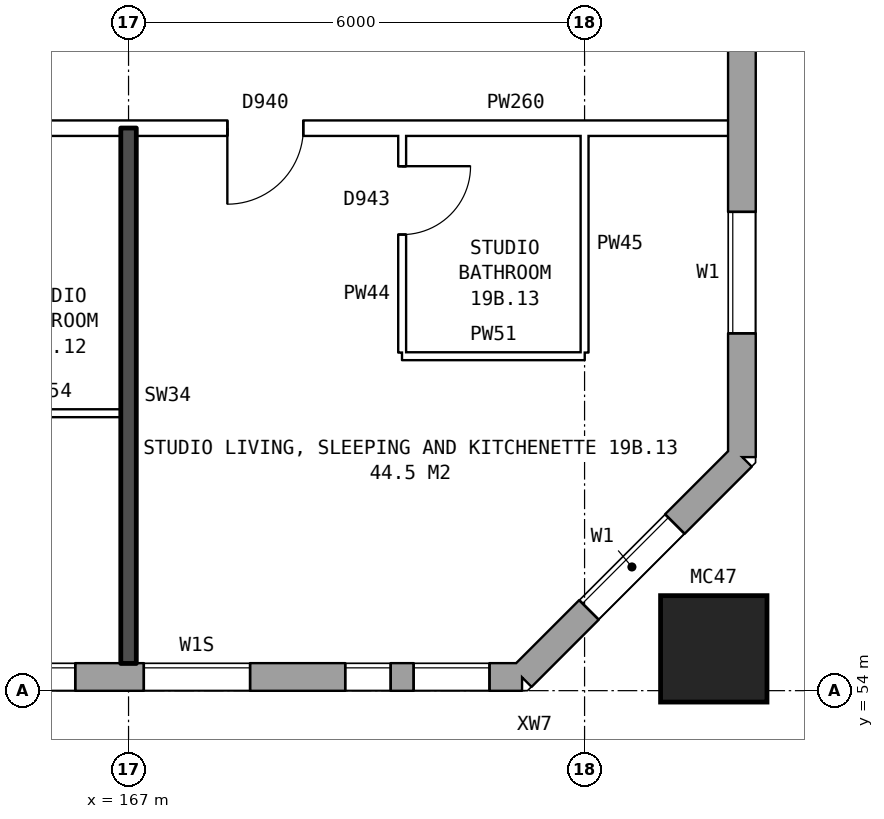
"""IFC4 building model, lengths in metres.
Left out: names, types, materials, properties, quantities, classifications, styles, units other than length and angle.
Written with IfcOpenShell. Run it as: python <this file> out.ifc"""

import sys

from ifc_helpers import new_model, si_unit, direction, frame, frame_2d, origin, origin_2d, place, context, subcontext, project, spatial, rectangle, hollow_rectangle, extrude, element, fill, save


model = new_model("IFC4")
c1 = context("Model", 3, precision=1e-05, world=origin(), true_north=direction((0.0, 1.0)))
c2 = subcontext(c1, "Body", "Model", "MODEL_VIEW")
j1 = project(units=[si_unit("LENGTHUNIT", "METRE"), si_unit("PLANEANGLEUNIT", "RADIAN")], contexts=[c1])
p1 = place(None, origin())
s1 = spatial("IfcSite", under=j1, at=p1, CompositionType="ELEMENT")
p2 = place(p1, origin())
s2 = spatial("IfcBuilding", under=s1, at=p2, CompositionType="ELEMENT")
p3 = place(p2, frame((0.0, 0.0, 71.6)))
s3 = spatial("IfcBuildingStorey", under=s2, at=p3, CompositionType="ELEMENT", Elevation=71.6)
p4 = place(p3, frame((174.7, 54.55, 0.0), z_axis=(0.0, 0.0, 1.0), x_axis=(1.0, 0.0, 0.0)))
e1 = element("IfcColumn", 1, at=p4, inside=s3, PredefinedType="COLUMN", context=c2, shape_type="SweptSolid", body=[
    extrude(hollow_rectangle(XDim=1.4, YDim=1.4, WallThickness=0.075, at=origin_2d()), origin(), (0.0, 0.0, 1.0), 3.1),
])
p5 = place(p3, frame((134.075, 54.18, 0.0), z_axis=(0.0, 0.0, 1.0), x_axis=(1.0, 0.0, 0.0)))
e2 = element("IfcWall", 2, at=p5, inside=s3, PredefinedType="STANDARD", context=c2, shape_type="SweptSolid", body=[
    extrude(rectangle(XDim=38.101, YDim=0.36, at=frame_2d((19.05, 0.0))), origin(), (0.0, 0.0, 1.0), 2.85),
])
p6 = place(p5, frame((0.3, 0.0, 0.8)))
e3 = element("IfcOpeningElement", 3, at=p6, cuts=e2, PredefinedType="OPENING", context=c2, shape_type="SweptSolid", body=[
    extrude(rectangle(XDim=1.0, YDim=1.8, at=frame_2d((0.5, 0.9))), frame((0.0, 0.19, 0.0), z_axis=(0.0, -1.0, 0.0), x_axis=(1.0, 0.0, 0.0)), (0.0, 0.0, 1.0), 0.38),
])
p7 = place(p5, frame((3.525, 0.0, 0.8)))
e4 = element("IfcOpeningElement", 4, at=p7, cuts=e2, PredefinedType="OPENING", context=c2, shape_type="SweptSolid", body=[
    extrude(rectangle(XDim=0.8, YDim=0.9, at=frame_2d((0.4, 0.45))), frame((0.0, 0.19, 0.0), z_axis=(0.0, -1.0, 0.0), x_axis=(1.0, 0.0, 0.0)), (0.0, 0.0, 1.0), 0.38),
])
p8 = place(p5, frame((6.625, 0.0, 0.8)))
e5 = element("IfcOpeningElement", 5, at=p8, cuts=e2, PredefinedType="OPENING", context=c2, shape_type="SweptSolid", body=[
    extrude(rectangle(XDim=1.6, YDim=1.8, at=frame_2d((0.8, 0.9))), frame((0.0, 0.19, 0.0), z_axis=(0.0, -1.0, 0.0), x_axis=(1.0, 0.0, 0.0)), (0.0, 0.0, 1.0), 0.38),
])
p9 = place(p5, frame((9.625, 0.0, 0.8)))
e6 = element("IfcOpeningElement", 6, at=p9, cuts=e2, PredefinedType="OPENING", context=c2, shape_type="SweptSolid", body=[
    extrude(rectangle(XDim=1.6, YDim=1.8, at=frame_2d((0.8, 0.9))), frame((0.0, 0.19, 0.0), z_axis=(0.0, -1.0, 0.0), x_axis=(1.0, 0.0, 0.0)), (0.0, 0.0, 1.0), 0.38),
])
p10 = place(p5, frame((12.625, 0.0, 0.8)))
e7 = element("IfcOpeningElement", 7, at=p10, cuts=e2, PredefinedType="OPENING", context=c2, shape_type="SweptSolid", body=[
    extrude(rectangle(XDim=1.6, YDim=1.8, at=frame_2d((0.8, 0.9))), frame((0.0, 0.19, 0.0), z_axis=(0.0, -1.0, 0.0), x_axis=(1.0, 0.0, 0.0)), (0.0, 0.0, 1.0), 0.38),
])
p11 = place(p5, frame((15.625, 0.0, 0.8)))
e8 = element("IfcOpeningElement", 8, at=p11, cuts=e2, PredefinedType="OPENING", context=c2, shape_type="SweptSolid", body=[
    extrude(rectangle(XDim=1.6, YDim=1.8, at=frame_2d((0.8, 0.9))), frame((0.0, 0.19, 0.0), z_axis=(0.0, -1.0, 0.0), x_axis=(1.0, 0.0, 0.0)), (0.0, 0.0, 1.0), 0.38),
])
p12 = place(p5, frame((18.625, 0.0, 0.8)))
e9 = element("IfcOpeningElement", 9, at=p12, cuts=e2, PredefinedType="OPENING", context=c2, shape_type="SweptSolid", body=[
    extrude(rectangle(XDim=1.6, YDim=1.8, at=frame_2d((0.8, 0.9))), frame((0.0, 0.19, 0.0), z_axis=(0.0, -1.0, 0.0), x_axis=(1.0, 0.0, 0.0)), (0.0, 0.0, 1.0), 0.38),
])
p13 = place(p5, frame((21.625, 0.0, 0.8)))
e10 = element("IfcOpeningElement", 10, at=p13, cuts=e2, PredefinedType="OPENING", context=c2, shape_type="SweptSolid", body=[
    extrude(rectangle(XDim=1.6, YDim=1.8, at=frame_2d((0.8, 0.9))), frame((0.0, 0.19, 0.0), z_axis=(0.0, -1.0, 0.0), x_axis=(1.0, 0.0, 0.0)), (0.0, 0.0, 1.0), 0.38),
])
p14 = place(p5, frame((24.625, 0.0, 0.8)))
e11 = element("IfcOpeningElement", 11, at=p14, cuts=e2, PredefinedType="OPENING", context=c2, shape_type="SweptSolid", body=[
    extrude(rectangle(XDim=1.6, YDim=1.8, at=frame_2d((0.8, 0.9))), frame((0.0, 0.19, 0.0), z_axis=(0.0, -1.0, 0.0), x_axis=(1.0, 0.0, 0.0)), (0.0, 0.0, 1.0), 0.38),
])
p15 = place(p5, frame((27.625, 0.0, 0.8)))
e12 = element("IfcOpeningElement", 12, at=p15, cuts=e2, PredefinedType="OPENING", context=c2, shape_type="SweptSolid", body=[
    extrude(rectangle(XDim=1.6, YDim=1.8, at=frame_2d((0.8, 0.9))), frame((0.0, 0.19, 0.0), z_axis=(0.0, -1.0, 0.0), x_axis=(1.0, 0.0, 0.0)), (0.0, 0.0, 1.0), 0.38),
])
p16 = place(p5, frame((30.625, 0.0, 0.8)))
e13 = element("IfcOpeningElement", 13, at=p16, cuts=e2, PredefinedType="OPENING", context=c2, shape_type="SweptSolid", body=[
    extrude(rectangle(XDim=1.6, YDim=1.8, at=frame_2d((0.8, 0.9))), frame((0.0, 0.19, 0.0), z_axis=(0.0, -1.0, 0.0), x_axis=(1.0, 0.0, 0.0)), (0.0, 0.0, 1.0), 0.38),
])
p17 = place(p5, frame((33.125, 0.0, 0.8)))
e14 = element("IfcOpeningElement", 14, at=p17, cuts=e2, PredefinedType="OPENING", context=c2, shape_type="SweptSolid", body=[
    extrude(rectangle(XDim=1.4, YDim=0.9, at=frame_2d((0.7, 0.45))), frame((0.0, 0.19, 0.0), z_axis=(0.0, -1.0, 0.0), x_axis=(1.0, 0.0, 0.0)), (0.0, 0.0, 1.0), 0.38),
])
p18 = place(p5, frame((1.6, 0.0, 1.6)))
e15 = element("IfcOpeningElement", 15, at=p18, cuts=e2, PredefinedType="OPENING", context=c2, shape_type="SweptSolid", body=[
    extrude(rectangle(XDim=0.6, YDim=0.9, at=frame_2d((0.3, 0.45))), frame((0.0, 0.19, 0.0), z_axis=(0.0, -1.0, 0.0), x_axis=(1.0, 0.0, 0.0)), (0.0, 0.0, 1.0), 0.38),
])
p19 = place(p5, frame((4.625, 0.0, 0.8)))
e16 = element("IfcOpeningElement", 16, at=p19, cuts=e2, PredefinedType="OPENING", context=c2, shape_type="SweptSolid", body=[
    extrude(rectangle(XDim=1.6, YDim=1.8, at=frame_2d((0.8, 0.9))), frame((0.0, 0.19, 0.0), z_axis=(0.0, -1.0, 0.0), x_axis=(1.0, 0.0, 0.0)), (0.0, 0.0, 1.0), 0.38),
])
p20 = place(p5, frame((35.775, 0.0, 1.7)))
e17 = element("IfcOpeningElement", 17, at=p20, cuts=e2, PredefinedType="OPENING", context=c2, shape_type="SweptSolid", body=[
    extrude(rectangle(XDim=0.6, YDim=0.9, at=frame_2d((0.3, 0.45))), frame((0.0, 0.19, 0.0), z_axis=(0.0, -1.0, 0.0), x_axis=(1.0, 0.0, 0.0)), (0.0, 0.0, 1.0), 0.38),
])
p21 = place(p5, frame((36.675, 0.0, 0.8)))
e18 = element("IfcOpeningElement", 18, at=p21, cuts=e2, PredefinedType="OPENING", context=c2, shape_type="SweptSolid", body=[
    extrude(rectangle(XDim=1.0, YDim=1.8, at=frame_2d((0.5, 0.9))), frame((0.0, 0.19, 0.0), z_axis=(0.0, -1.0, 0.0), x_axis=(1.0, 0.0, 0.0)), (0.0, 0.0, 1.0), 0.38),
])
p22 = place(p3, frame((172.175, 54.18, 0.0), z_axis=(0.0, 0.0, 1.0), x_axis=(0.707106781187, 0.707106781187, 0.0)))
e19 = element("IfcWall", 19, at=p22, inside=s3, PredefinedType="STANDARD", context=c2, shape_type="SweptSolid", body=[
    extrude(rectangle(XDim=4.094, YDim=0.36, at=frame_2d((2.047, 0.0))), origin(), (0.0, 0.0, 1.0), 2.85),
])
p23 = place(p22, frame((1.247, 0.0, 0.8)))
e20 = element("IfcOpeningElement", 20, at=p23, cuts=e19, PredefinedType="OPENING", context=c2, shape_type="SweptSolid", body=[
    extrude(rectangle(XDim=1.6, YDim=1.8, at=frame_2d((0.8, 0.9))), frame((0.0, 0.19, 0.0), z_axis=(0.0, -1.0, 0.0), x_axis=(1.0, 0.0, 0.0)), (0.0, 0.0, 1.0), 0.38),
])
p24 = place(p3, frame((175.07, 57.075, 0.0), z_axis=(0.0, 0.0, 1.0), x_axis=(0.0, 1.0, 0.0)))
e21 = element("IfcWall", 21, at=p24, inside=s3, PredefinedType="STANDARD", context=c2, shape_type="SweptSolid", body=[
    extrude(rectangle(XDim=25.851, YDim=0.36, at=frame_2d((12.925, 0.0))), origin(), (0.0, 0.0, 1.0), 2.85),
])
p25 = place(p24, frame((1.625, 0.0, 0.8)))
e22 = element("IfcOpeningElement", 22, at=p25, cuts=e21, PredefinedType="OPENING", context=c2, shape_type="SweptSolid", body=[
    extrude(rectangle(XDim=1.6, YDim=1.8, at=frame_2d((0.8, 0.9))), frame((0.0, 0.19, 0.0), z_axis=(0.0, -1.0, 0.0), x_axis=(1.0, 0.0, 0.0)), (0.0, 0.0, 1.0), 0.38),
])
p26 = place(p24, frame((5.775, 0.0, 0.8)))
e23 = element("IfcOpeningElement", 23, at=p26, cuts=e21, PredefinedType="OPENING", context=c2, shape_type="SweptSolid", body=[
    extrude(rectangle(XDim=0.6, YDim=0.9, at=frame_2d((0.3, 0.45))), frame((0.0, 0.19, 0.0), z_axis=(0.0, -1.0, 0.0), x_axis=(1.0, 0.0, 0.0)), (0.0, 0.0, 1.0), 0.38),
])
p27 = place(p24, frame((7.625, 0.0, 0.8)))
e24 = element("IfcOpeningElement", 24, at=p27, cuts=e21, PredefinedType="OPENING", context=c2, shape_type="SweptSolid", body=[
    extrude(rectangle(XDim=1.6, YDim=1.8, at=frame_2d((0.8, 0.9))), frame((0.0, 0.19, 0.0), z_axis=(0.0, -1.0, 0.0), x_axis=(1.0, 0.0, 0.0)), (0.0, 0.0, 1.0), 0.38),
])
p28 = place(p24, frame((10.625, 0.0, 0.8)))
e25 = element("IfcOpeningElement", 25, at=p28, cuts=e21, PredefinedType="OPENING", context=c2, shape_type="SweptSolid", body=[
    extrude(rectangle(XDim=1.6, YDim=1.8, at=frame_2d((0.8, 0.9))), frame((0.0, 0.19, 0.0), z_axis=(0.0, -1.0, 0.0), x_axis=(1.0, 0.0, 0.0)), (0.0, 0.0, 1.0), 0.38),
])
p29 = place(p24, frame((13.625, 0.0, 0.8)))
e26 = element("IfcOpeningElement", 26, at=p29, cuts=e21, PredefinedType="OPENING", context=c2, shape_type="SweptSolid", body=[
    extrude(rectangle(XDim=1.6, YDim=1.8, at=frame_2d((0.8, 0.9))), frame((0.0, 0.19, 0.0), z_axis=(0.0, -1.0, 0.0), x_axis=(1.0, 0.0, 0.0)), (0.0, 0.0, 1.0), 0.38),
])
p30 = place(p24, frame((16.625, 0.0, 0.8)))
e27 = element("IfcOpeningElement", 27, at=p30, cuts=e21, PredefinedType="OPENING", context=c2, shape_type="SweptSolid", body=[
    extrude(rectangle(XDim=1.6, YDim=1.8, at=frame_2d((0.8, 0.9))), frame((0.0, 0.19, 0.0), z_axis=(0.0, -1.0, 0.0), x_axis=(1.0, 0.0, 0.0)), (0.0, 0.0, 1.0), 0.38),
])
p31 = place(p24, frame((6.675, 0.0, 0.8)))
e28 = element("IfcOpeningElement", 28, at=p31, cuts=e21, PredefinedType="OPENING", context=c2, shape_type="SweptSolid", body=[
    extrude(rectangle(XDim=0.6, YDim=1.5, at=frame_2d((0.3, 0.75))), frame((0.0, 0.19, 0.0), z_axis=(0.0, -1.0, 0.0), x_axis=(1.0, 0.0, 0.0)), (0.0, 0.0, 1.0), 0.38),
])
p32 = place(p24, frame((22.625, 0.0, 0.8)))
e29 = element("IfcOpeningElement", 29, at=p32, cuts=e21, PredefinedType="OPENING", context=c2, shape_type="SweptSolid", body=[
    extrude(rectangle(XDim=1.6, YDim=1.8, at=frame_2d((0.8, 0.9))), frame((0.0, 0.19, 0.0), z_axis=(0.0, -1.0, 0.0), x_axis=(1.0, 0.0, 0.0)), (0.0, 0.0, 1.0), 0.38),
])
p33 = place(p24, frame((9.525, 0.0, 0.8)))
e30 = element("IfcOpeningElement", 30, at=p33, cuts=e21, PredefinedType="OPENING", context=c2, shape_type="SweptSolid", body=[
    extrude(rectangle(XDim=0.8, YDim=1.8, at=frame_2d((0.4, 0.9))), frame((0.0, 0.19, 0.0), z_axis=(0.0, -1.0, 0.0), x_axis=(1.0, 0.0, 0.0)), (0.0, 0.0, 1.0), 0.38),
])
p34 = place(p24, frame((12.525, 0.0, 0.8)))
e31 = element("IfcOpeningElement", 31, at=p34, cuts=e21, PredefinedType="OPENING", context=c2, shape_type="SweptSolid", body=[
    extrude(rectangle(XDim=0.8, YDim=1.8, at=frame_2d((0.4, 0.9))), frame((0.0, 0.19, 0.0), z_axis=(0.0, -1.0, 0.0), x_axis=(1.0, 0.0, 0.0)), (0.0, 0.0, 1.0), 0.38),
])
p35 = place(p24, frame((15.525, 0.0, 0.8)))
e32 = element("IfcOpeningElement", 32, at=p35, cuts=e21, PredefinedType="OPENING", context=c2, shape_type="SweptSolid", body=[
    extrude(rectangle(XDim=0.8, YDim=1.8, at=frame_2d((0.4, 0.9))), frame((0.0, 0.19, 0.0), z_axis=(0.0, -1.0, 0.0), x_axis=(1.0, 0.0, 0.0)), (0.0, 0.0, 1.0), 0.38),
])
p36 = place(p24, frame((18.525, 0.0, 0.8)))
e33 = element("IfcOpeningElement", 33, at=p36, cuts=e21, PredefinedType="OPENING", context=c2, shape_type="SweptSolid", body=[
    extrude(rectangle(XDim=0.6, YDim=1.5, at=frame_2d((0.3, 0.75))), frame((0.0, 0.19, 0.0), z_axis=(0.0, -1.0, 0.0), x_axis=(1.0, 0.0, 0.0)), (0.0, 0.0, 1.0), 0.38),
])
p37 = place(p24, frame((19.425, 0.0, 0.8)))
e34 = element("IfcOpeningElement", 34, at=p37, cuts=e21, PredefinedType="OPENING", context=c2, shape_type="SweptSolid", body=[
    extrude(rectangle(XDim=0.6, YDim=0.9, at=frame_2d((0.3, 0.45))), frame((0.0, 0.19, 0.0), z_axis=(0.0, -1.0, 0.0), x_axis=(1.0, 0.0, 0.0)), (0.0, 0.0, 1.0), 0.38),
])
p38 = place(p3, frame((165.0, 57.65, 0.0), z_axis=(0.0, 0.0, 1.0), x_axis=(1.0, 0.0, 0.0)))
e35 = element("IfcWall", 35, at=p38, inside=s3, PredefinedType="PARTITIONING", context=c2, shape_type="SweptSolid", body=[
    extrude(rectangle(XDim=1.9, YDim=0.1, at=frame_2d((0.95, 0.0))), origin(), (0.0, 0.0, 1.0), 2.85),
])
p39 = place(p3, frame((170.6, 58.4, 0.0), z_axis=(0.0, 0.0, 1.0), x_axis=(1.0, 0.0, 0.0)))
e36 = element("IfcWall", 36, at=p39, inside=s3, PredefinedType="PARTITIONING", context=c2, shape_type="SweptSolid", body=[
    extrude(rectangle(XDim=2.4, YDim=0.1, at=frame_2d((1.2, 0.0))), origin(), (0.0, 0.0, 1.0), 2.85),
])
p40 = place(p3, frame((155.1, 61.4, 0.0), z_axis=(0.0, 0.0, 1.0), x_axis=(1.0, 0.0, 0.0)))
e37 = element("IfcWall", 37, at=p40, inside=s3, PredefinedType="PARTITIONING", context=c2, shape_type="SweptSolid", body=[
    extrude(rectangle(XDim=19.79, YDim=0.2, at=frame_2d((9.895, 0.0))), origin(), (0.0, 0.0, 1.0), 2.85),
])
p41 = place(p40, frame((1.45, 0.0, 0.0)))
e38 = element("IfcOpeningElement", 38, at=p41, cuts=e37, PredefinedType="OPENING", context=c2, shape_type="SweptSolid", body=[
    extrude(rectangle(XDim=1.0, YDim=2.1, at=frame_2d((0.5, 1.05))), frame((0.0, 0.11, 0.0), z_axis=(0.0, -1.0, 0.0), x_axis=(1.0, 0.0, 0.0)), (0.0, 0.0, 1.0), 0.22),
])
p42 = place(p40, frame((7.4, 0.0, 0.0)))
e39 = element("IfcOpeningElement", 39, at=p42, cuts=e37, PredefinedType="OPENING", context=c2, shape_type="SweptSolid", body=[
    extrude(rectangle(XDim=1.0, YDim=2.1, at=frame_2d((0.5, 1.05))), frame((0.0, 0.11, 0.0), z_axis=(0.0, -1.0, 0.0), x_axis=(1.0, 0.0, 0.0)), (0.0, 0.0, 1.0), 0.22),
])
p43 = place(p40, frame((13.2, 0.0, 0.0)))
e40 = element("IfcOpeningElement", 40, at=p43, cuts=e37, PredefinedType="OPENING", context=c2, shape_type="SweptSolid", body=[
    extrude(rectangle(XDim=1.0, YDim=2.1, at=frame_2d((0.5, 1.05))), frame((0.0, 0.11, 0.0), z_axis=(0.0, -1.0, 0.0), x_axis=(1.0, 0.0, 0.0)), (0.0, 0.0, 1.0), 0.22),
])
p44 = place(p3, frame((167.0, 54.36, 0.0), z_axis=(0.0, 0.0, 1.0), x_axis=(0.0, 1.0, 0.0)))
e41 = element("IfcWall", 41, at=p44, inside=s3, PredefinedType="SOLIDWALL", context=c2, shape_type="SweptSolid", body=[
    extrude(rectangle(XDim=7.04, YDim=0.2, at=frame_2d((3.52, 0.0))), origin(), (0.0, 0.0, 1.0), 2.85),
])
p45 = place(p3, frame((170.6, 58.45, 0.0), z_axis=(0.0, 0.0, 1.0), x_axis=(0.0, 1.0, 0.0)))
e42 = element("IfcWall", 42, at=p45, inside=s3, PredefinedType="PARTITIONING", context=c2, shape_type="SweptSolid", body=[
    extrude(rectangle(XDim=2.85, YDim=0.1, at=frame_2d((1.425, 0.0))), origin(), (0.0, 0.0, 1.0), 2.85),
])
p46 = place(p45, frame((1.55, 0.0, 0.0)))
e43 = element("IfcOpeningElement", 43, at=p46, cuts=e42, PredefinedType="OPENING", context=c2, shape_type="SweptSolid", body=[
    extrude(rectangle(XDim=0.9, YDim=2.1, at=frame_2d((0.45, 1.05))), frame((0.0, 0.06, 0.0), z_axis=(0.0, -1.0, 0.0), x_axis=(1.0, 0.0, 0.0)), (0.0, 0.0, 1.0), 0.12),
])
p47 = place(p3, frame((173.0, 58.45, 0.0), z_axis=(0.0, 0.0, 1.0), x_axis=(0.0, 1.0, 0.0)))
e44 = element("IfcWall", 44, at=p47, inside=s3, PredefinedType="PARTITIONING", context=c2, shape_type="SweptSolid", body=[
    extrude(rectangle(XDim=2.85, YDim=0.1, at=frame_2d((1.425, 0.0))), origin(), (0.0, 0.0, 1.0), 2.85),
])
p48 = place(p16, origin())
e45 = element("IfcWindow", 45, at=p48, inside=s3, PartitioningType="SINGLE_PANEL", PredefinedType="WINDOW", context=c2, shape_type="SweptSolid", body=[
    extrude(rectangle(XDim=1.6, YDim=1.8, at=frame_2d((0.8, 0.9))), frame((0.0, 0.15, 0.0), z_axis=(0.0, -1.0, 0.0), x_axis=(1.0, 0.0, 0.0)), (0.0, 0.0, 1.0), 0.06),
])
fill(e13, e45)
p49 = place(p17, origin())
e46 = element("IfcWindow", 46, at=p49, inside=s3, PartitioningType="SINGLE_PANEL", PredefinedType="WINDOW", context=c2, shape_type="SweptSolid", body=[
    extrude(rectangle(XDim=1.4, YDim=0.9, at=frame_2d((0.7, 0.45))), frame((0.0, 0.15, 0.0), z_axis=(0.0, -1.0, 0.0), x_axis=(1.0, 0.0, 0.0)), (0.0, 0.0, 1.0), 0.06),
])
fill(e14, e46)
p50 = place(p23, origin())
e47 = element("IfcWindow", 47, at=p50, inside=s3, PartitioningType="SINGLE_PANEL", PredefinedType="WINDOW", context=c2, shape_type="SweptSolid", body=[
    extrude(rectangle(XDim=1.6, YDim=1.8, at=frame_2d((0.8, 0.9))), frame((0.0, 0.15, 0.0), z_axis=(0.0, -1.0, 0.0), x_axis=(1.0, 0.0, 0.0)), (0.0, 0.0, 1.0), 0.06),
])
fill(e20, e47)
p51 = place(p25, origin())
e48 = element("IfcWindow", 48, at=p51, inside=s3, PartitioningType="SINGLE_PANEL", PredefinedType="WINDOW", context=c2, shape_type="SweptSolid", body=[
    extrude(rectangle(XDim=1.6, YDim=1.8, at=frame_2d((0.8, 0.9))), frame((0.0, 0.15, 0.0), z_axis=(0.0, -1.0, 0.0), x_axis=(1.0, 0.0, 0.0)), (0.0, 0.0, 1.0), 0.06),
])
fill(e22, e48)
p52 = place(p43, frame((1.0, 0.0, 0.0), z_axis=(0.0, 0.0, 1.0), x_axis=(-1.0, 0.0, 0.0)))
e49 = element("IfcDoor", 49, at=p52, inside=s3, OperationType="SINGLE_SWING_RIGHT", PredefinedType="DOOR", context=c2, shape_type="SweptSolid", body=[
    extrude(rectangle(XDim=1.0, YDim=2.1, at=frame_2d((0.5, 1.05))), frame((0.0, 0.025, 0.0), z_axis=(0.0, -1.0, 0.0), x_axis=(1.0, 0.0, 0.0)), (0.0, 0.0, 1.0), 0.05),
])
fill(e40, e49)
p53 = place(p46, frame((0.9, 0.0, 0.0), z_axis=(0.0, 0.0, 1.0), x_axis=(-1.0, 0.0, 0.0)))
e50 = element("IfcDoor", 50, at=p53, inside=s3, OperationType="SINGLE_SWING_LEFT", PredefinedType="DOOR", context=c2, shape_type="SweptSolid", body=[
    extrude(rectangle(XDim=0.9, YDim=2.1, at=frame_2d((0.45, 1.05))), frame((0.0, 0.025, 0.0), z_axis=(0.0, -1.0, 0.0), x_axis=(1.0, 0.0, 0.0)), (0.0, 0.0, 1.0), 0.05),
])
fill(e43, e50)
p54 = place(p20, origin())
e51 = element("IfcWindow", 51, at=p54, inside=s3, PartitioningType="SINGLE_PANEL", PredefinedType="WINDOW", context=c2, shape_type="SweptSolid", body=[
    extrude(rectangle(XDim=0.6, YDim=0.9, at=frame_2d((0.3, 0.45))), frame((0.0, 0.15, 0.0), z_axis=(0.0, -1.0, 0.0), x_axis=(1.0, 0.0, 0.0)), (0.0, 0.0, 1.0), 0.06),
])
fill(e17, e51)
p55 = place(p21, origin())
e52 = element("IfcWindow", 52, at=p55, inside=s3, PartitioningType="SINGLE_PANEL", PredefinedType="WINDOW", context=c2, shape_type="SweptSolid", body=[
    extrude(rectangle(XDim=1.0, YDim=1.8, at=frame_2d((0.5, 0.9))), frame((0.0, 0.15, 0.0), z_axis=(0.0, -1.0, 0.0), x_axis=(1.0, 0.0, 0.0)), (0.0, 0.0, 1.0), 0.06),
])
fill(e18, e52)
save(model, sys.argv[1])
